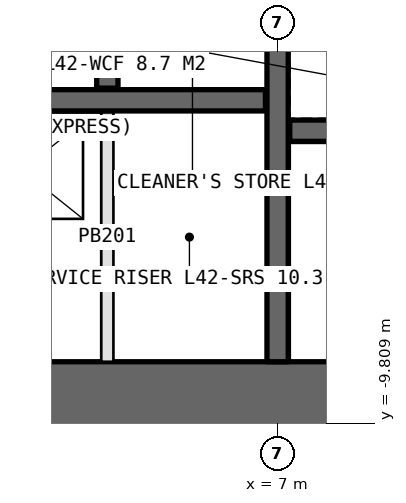
"""IFC4 building model, lengths in metres.
Left out: names, types, materials, properties, quantities, classifications, styles, units other than length and angle.
Written with IfcOpenShell. Run it as: python <this file> out.ifc"""

import sys

from ifc_helpers import new_model, si_unit, direction, frame, frame_2d, origin, place, context, subcontext, project, spatial, rectangle, extrude, element, save


model = new_model("IFC4")
c1 = context("Model", 3, precision=1e-05, world=origin(), true_north=direction((0.0, 1.0)))
c2 = subcontext(c1, "Body", "Model", "MODEL_VIEW")
j1 = project(units=[si_unit("LENGTHUNIT", "METRE"), si_unit("PLANEANGLEUNIT", "RADIAN")], contexts=[c1])
p1 = place(None, origin())
s1 = spatial("IfcSite", under=j1, at=p1, CompositionType="ELEMENT")
p2 = place(p1, origin())
s2 = spatial("IfcBuilding", under=s1, at=p2, CompositionType="ELEMENT")
p3 = place(p2, frame((0.0, 0.0, 194.8)))
s3 = spatial("IfcBuildingStorey", under=s2, at=p3, CompositionType="ELEMENT", Elevation=194.8)
p4 = place(p3, frame((-14.0, -9.4, 0.0), z_axis=(0.0, 0.0, 1.0), x_axis=(1.0, 0.0, 0.0)))
e1 = element("IfcWall", 1, at=p4, inside=s3, PredefinedType="SHEAR", context=c2, shape_type="SweptSolid", body=[
    extrude(rectangle(XDim=28.0, YDim=1.2, at=frame_2d((14.0, 0.0))), origin(), (0.0, 0.0, 1.0), 4.2),
])
p5 = place(p4, frame((22.9, 0.0, 0.0)))
e2 = element("IfcOpeningElement", 2, at=p5, cuts=e1, PredefinedType="OPENING", context=c2, shape_type="SweptSolid", body=[
    extrude(rectangle(XDim=2.2, YDim=2.7, at=frame_2d((1.1, 1.35))), frame((0.0, 0.61, 0.0), z_axis=(0.0, -1.0, 0.0), x_axis=(1.0, 0.0, 0.0)), (0.0, 0.0, 1.0), 1.22),
])
p6 = place(p3, frame((7.0, -8.8, 0.0), z_axis=(0.0, 0.0, 1.0), x_axis=(0.0, 1.0, 0.0)))
e3 = element("IfcWall", 3, at=p6, inside=s3, PredefinedType="SHEAR", context=c2, shape_type="SweptSolid", body=[
    extrude(rectangle(XDim=17.6, YDim=0.35, at=frame_2d((8.8, 0.0))), origin(), (0.0, 0.0, 1.0), 4.2),
])
p7 = place(p6, frame((7.9, 0.0, 0.0)))
e4 = element("IfcOpeningElement", 4, at=p7, cuts=e3, PredefinedType="OPENING", context=c2, shape_type="SweptSolid", body=[
    extrude(rectangle(XDim=1.8, YDim=2.4, at=frame_2d((0.9, 1.2))), frame((0.0, 0.185, 0.0), z_axis=(0.0, -1.0, 0.0), x_axis=(1.0, 0.0, 0.0)), (0.0, 0.0, 1.0), 0.37),
])
p8 = place(p3, frame((-6.8, -4.5, 0.0), z_axis=(0.0, 0.0, 1.0), x_axis=(1.0, 0.0, 0.0)))
e5 = element("IfcWall", 5, at=p8, inside=s3, PredefinedType="SHEAR", context=c2, shape_type="SweptSolid", body=[
    extrude(rectangle(XDim=13.6, YDim=0.35, at=frame_2d((6.8, 0.0))), origin(), (0.0, 0.0, 1.0), 4.2),
])
p9 = place(p3, frame((7.2, -5.0, 0.0), z_axis=(0.0, 0.0, 1.0), x_axis=(1.0, 0.0, 0.0)))
e6 = element("IfcWall", 6, at=p9, inside=s3, PredefinedType="SHEAR", context=c2, shape_type="SweptSolid", body=[
    extrude(rectangle(XDim=5.6, YDim=0.35, at=frame_2d((2.8, 0.0))), origin(), (0.0, 0.0, 1.0), 4.2),
])
p10 = place(p3, frame((4.2, -4.3, 0.0), z_axis=(0.0, 0.0, 1.0), x_axis=(0.0, 1.0, 0.0)))
e7 = element("IfcWall", 7, at=p10, inside=s3, PredefinedType="SHEAR", context=c2, shape_type="SweptSolid", body=[
    extrude(rectangle(XDim=2.5, YDim=0.35, at=frame_2d((1.25, 0.0))), origin(), (0.0, 0.0, 1.0), 4.2),
])
p11 = place(p3, frame((4.2, -4.7, 0.0), z_axis=(0.0, 0.0, 1.0), x_axis=(0.0, -1.0, 0.0)))
e8 = element("IfcWall", 8, at=p11, inside=s3, PredefinedType="PARTITIONING", context=c2, shape_type="SweptSolid", body=[
    extrude(rectangle(XDim=4.1, YDim=0.2, at=frame_2d((2.05, 0.0))), origin(), (0.0, 0.0, 1.0), 4.2),
])
save(model, sys.argv[1])
